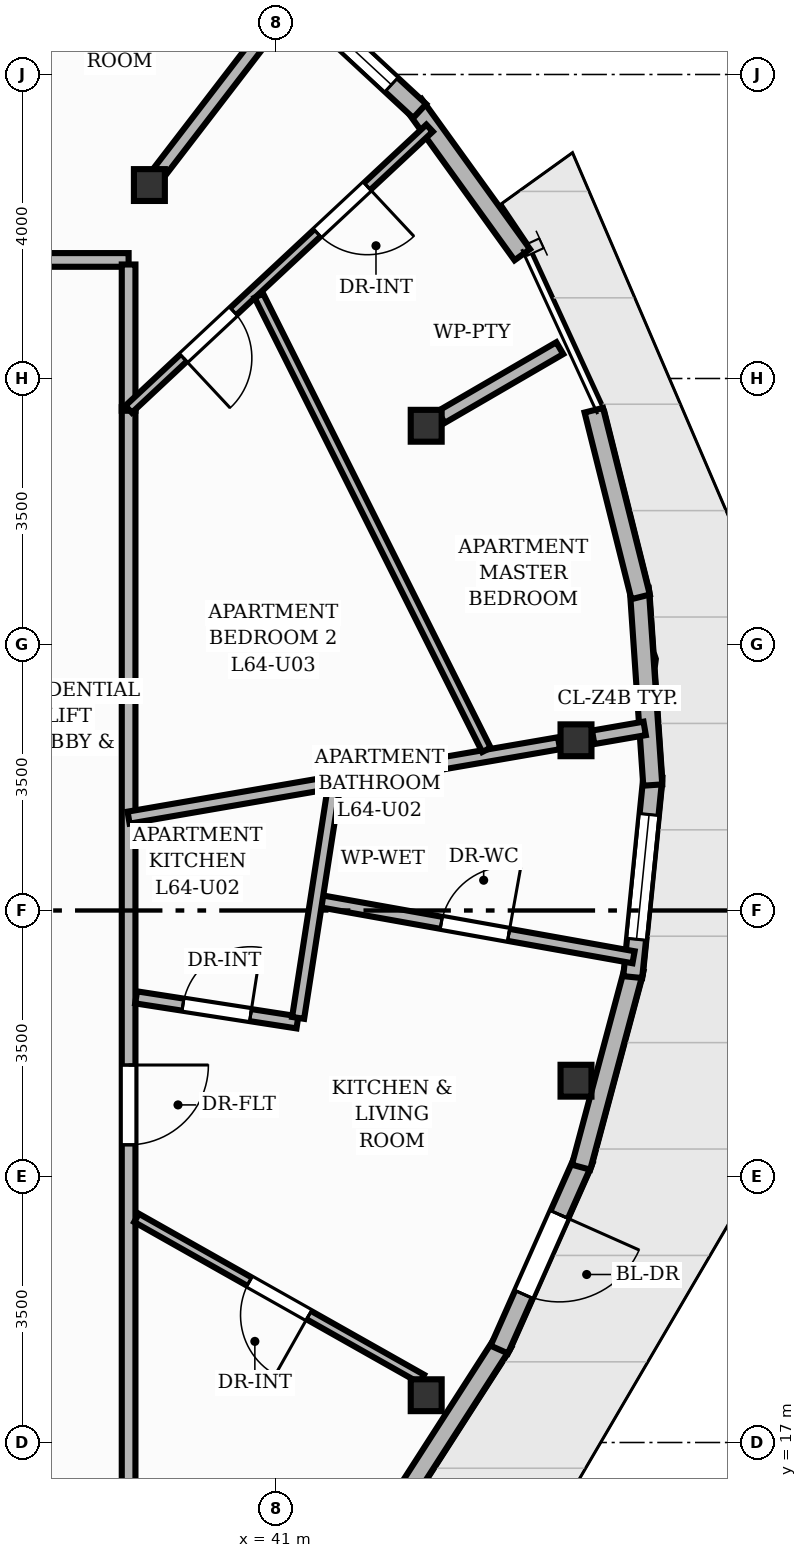
"""IFC4 building model, lengths in metres.
Left out: names, types, materials, properties, quantities, classifications, styles, units other than length and angle.
Written with IfcOpenShell. Run it as: python <this file> out.ifc"""

import sys

from ifc_helpers import new_model, si_unit, direction, frame, frame_2d, origin, origin_2d, place, context, subcontext, project, spatial, rectangle, i_section, extrude, element, fill, save


model = new_model("IFC4")
c1 = context("Model", 3, precision=1e-05, world=origin(), true_north=direction((0.0, 1.0)))
c2 = subcontext(c1, "Body", "Model", "MODEL_VIEW")
j1 = project(units=[si_unit("LENGTHUNIT", "METRE"), si_unit("PLANEANGLEUNIT", "RADIAN")], contexts=[c1])
p1 = place(None, origin())
s1 = spatial("IfcSite", under=j1, at=p1, CompositionType="ELEMENT")
p2 = place(p1, origin())
s2 = spatial("IfcBuilding", under=s1, at=p2, CompositionType="ELEMENT")
p3 = place(p2, frame((0.0, 0.0, 214.24)))
s3 = spatial("IfcBuildingStorey", under=s2, at=p3, CompositionType="ELEMENT", Elevation=214.24)
for number, where, z_axis, x_axis in (
    (1, (44.946, 26.24, 0.0), (0.0, 0.0, 1.0), (1.0, 0.0, 0.0)),
    (2, (42.975, 30.378, 0.0), (0.0, 0.0, 1.0), (1.0, 0.0, 0.0)),
    (3, (39.333, 33.545, 0.0), (0.0, 0.0, 1.0), (1.0, 0.0, 0.0)),
    (4, (42.975, 17.622, 0.0), (0.0, 0.0, 1.0), (1.0, 0.0, 0.0)),
    (5, (44.946, 21.76, 0.0), (0.0, 0.0, 1.0), (1.0, 0.0, 0.0)),
):
    element("IfcColumn", number, at=place(p3, frame(where, z_axis=z_axis, x_axis=x_axis)), inside=s3, PredefinedType="COLUMN", context=c2, shape_type="SweptSolid", body=[
        extrude(i_section(OverallWidth=0.407, OverallDepth=0.419, WebThickness=0.031, FlangeThickness=0.049, at=origin_2d()), origin(), (0.0, 0.0, 1.0), 3.2),
    ])
p4 = place(p3, frame((43.988, 18.319, 0.0), z_axis=(0.0, 0.0, 1.0), x_axis=(-0.540690479286, -0.841221615039, 0.0)))
e6 = element("IfcWall", 6, at=p4, inside=s3, PredefinedType="SOLIDWALL", context=c2, shape_type="SweptSolid", body=[
    extrude(rectangle(XDim=2.758, YDim=0.25, at=frame_2d((1.379, 0.0))), origin(), (0.0, 0.0, 1.0), 2.96),
])
p5 = place(p3, frame((45.049, 20.726, 0.0), z_axis=(0.0, 0.0, 1.0), x_axis=(-0.40624599189, -0.913763751783, 0.0)))
e7 = element("IfcWall", 7, at=p5, inside=s3, PredefinedType="SOLIDWALL", context=c2, shape_type="SweptSolid", body=[
    extrude(rectangle(XDim=2.739, YDim=0.25, at=frame_2d((1.369, 0.0))), origin(), (0.0, 0.0, 1.0), 2.96),
])
p6 = place(p5, frame((0.794, 0.0, 0.0)))
e8 = element("IfcOpeningElement", 8, at=p6, cuts=e7, PredefinedType="OPENING", context=c2, shape_type="SweptSolid", body=[
    extrude(rectangle(XDim=1.15, YDim=2.2, at=frame_2d((0.575, 1.1))), frame((0.0, 0.135, 0.0), z_axis=(0.0, -1.0, 0.0), x_axis=(1.0, 0.0, 0.0)), (0.0, 0.0, 1.0), 0.27),
])
p7 = place(p3, frame((45.712, 23.232, 0.0), z_axis=(0.0, 0.0, 1.0), x_axis=(-0.259023691836, -0.965870968126, 0.0)))
e9 = element("IfcWall", 9, at=p7, inside=s3, PredefinedType="SOLIDWALL", context=c2, shape_type="SweptSolid", body=[
    extrude(rectangle(XDim=2.701, YDim=0.25, at=frame_2d((1.351, 0.0))), origin(), (0.0, 0.0, 1.0), 2.577),
])
p8 = place(p3, frame((45.958, 25.761, 0.0), z_axis=(0.0, 0.0, 1.0), x_axis=(-0.100196668354, -0.99496765156, 0.0)))
e10 = element("IfcWall", 10, at=p8, inside=s3, PredefinedType="SOLIDWALL", context=c2, shape_type="SweptSolid", body=[
    extrude(rectangle(XDim=2.651, YDim=0.25, at=frame_2d((1.326, 0.0))), origin(), (0.0, 0.0, 1.0), 2.96),
])
p9 = place(p8, frame((0.501, 0.0, 0.85)))
e11 = element("IfcOpeningElement", 11, at=p9, cuts=e10, PredefinedType="OPENING", context=c2, shape_type="SweptSolid", body=[
    extrude(rectangle(XDim=1.65, YDim=1.55, at=frame_2d((0.825, 0.775))), frame((0.0, 0.135, 0.0), z_axis=(0.0, -1.0, 0.0), x_axis=(1.0, 0.0, 0.0)), (0.0, 0.0, 1.0), 0.27),
])
p10 = place(p3, frame((45.779, 28.237, 0.0), z_axis=(0.0, 0.0, 1.0), x_axis=(0.068469168344, -0.997653232835, 0.0)))
e12 = element("IfcWall", 12, at=p10, inside=s3, PredefinedType="SOLIDWALL", context=c2, shape_type="SweptSolid", body=[
    extrude(rectangle(XDim=2.592, YDim=0.25, at=frame_2d((1.296, 0.0))), origin(), (0.0, 0.0, 1.0), 2.96),
])
p11 = place(p3, frame((45.18, 30.583, 0.0), z_axis=(0.0, 0.0, 1.0), x_axis=(0.243170809566, -0.969983483042, 0.0)))
e13 = element("IfcWall", 13, at=p11, inside=s3, PredefinedType="SOLIDWALL", context=c2, shape_type="SweptSolid", body=[
    extrude(rectangle(XDim=2.532, YDim=0.25, at=frame_2d((1.266, 0.0))), origin(), (0.0, 0.0, 1.0), 2.96),
])
p12 = place(p3, frame((42.814, 34.605, 0.0), z_axis=(0.0, 0.0, 1.0), x_axis=(0.584824573101, -0.811159798497, 0.0)))
e14 = element("IfcWall", 14, at=p12, inside=s3, PredefinedType="SOLIDWALL", context=c2, shape_type="SweptSolid", body=[
    extrude(rectangle(XDim=2.437, YDim=0.25, at=frame_2d((1.218, 0.0))), origin(), (0.0, 0.0, 1.0), 2.96),
])
p13 = place(p3, frame((41.119, 36.161, 0.0), z_axis=(0.0, 0.0, 1.0), x_axis=(0.733441361842, -0.679752726173, 0.0)))
e15 = element("IfcWall", 15, at=p13, inside=s3, PredefinedType="SOLIDWALL", context=c2, shape_type="SweptSolid", body=[
    extrude(rectangle(XDim=2.415, YDim=0.25, at=frame_2d((1.207, 0.0))), origin(), (0.0, 0.0, 1.0), 2.96),
])
p14 = place(p13, frame((0.507, 0.0, 0.85)))
e16 = element("IfcOpeningElement", 16, at=p14, cuts=e15, PredefinedType="OPENING", context=c2, shape_type="SweptSolid", body=[
    extrude(rectangle(XDim=1.4, YDim=1.55, at=frame_2d((0.7, 0.775))), frame((0.0, 0.135, 0.0), z_axis=(0.0, -1.0, 0.0), x_axis=(1.0, 0.0, 0.0)), (0.0, 0.0, 1.0), 0.27),
])
p15 = place(p3, frame((45.173, 26.279, 0.0), z_axis=(0.0, 0.0, 1.0), x_axis=(0.985357392461, 0.170501639647, 0.0)))
e17 = element("IfcWall", 17, at=p15, inside=s3, PredefinedType="PARTITIONING", context=c2, shape_type="SweptSolid", body=[
    extrude(rectangle(XDim=0.687, YDim=0.18, at=frame_2d((0.344, 0.0))), origin(), (0.0, 0.0, 1.0), 2.403),
])
p16 = place(p3, frame((43.174, 30.493, 0.0), z_axis=(0.0, 0.0, 1.0), x_axis=(0.864637155841, 0.502396843879, 0.0)))
e18 = element("IfcWall", 18, at=p16, inside=s3, PredefinedType="PARTITIONING", context=c2, shape_type="SweptSolid", body=[
    extrude(rectangle(XDim=1.803, YDim=0.18, at=frame_2d((0.901, 0.0))), origin(), (0.0, 0.0, 1.0), 2.403),
])
p17 = place(p3, frame((39.473, 33.727, 0.0), z_axis=(0.0, 0.0, 1.0), x_axis=(0.609244614772, 0.792982344931, 0.0)))
e19 = element("IfcWall", 19, at=p17, inside=s3, PredefinedType="PARTITIONING", context=c2, shape_type="SweptSolid", body=[
    extrude(rectangle(XDim=2.861, YDim=0.18, at=frame_2d((1.43, 0.0))), origin(), (0.0, 0.0, 1.0), 2.403),
])
p18 = place(p3, frame((39.06, 30.623, 0.0), z_axis=(0.0, 0.0, 1.0), x_axis=(0.0, -1.0, 0.0)))
e20 = element("IfcWall", 20, at=p18, inside=s3, PredefinedType="PARTITIONING", context=c2, shape_type="SweptSolid", body=[
    extrude(rectangle(XDim=15.183, YDim=0.18, at=frame_2d((7.591, 0.0))), origin(), (0.0, 0.0, 1.0), 2.955),
])
p19 = place(p18, frame((8.656, 0.0, 0.0)))
e21 = element("IfcOpeningElement", 21, at=p19, cuts=e20, PredefinedType="OPENING", context=c2, shape_type="SweptSolid", body=[
    extrude(rectangle(XDim=1.05, YDim=2.15, at=frame_2d((0.525, 1.075))), frame((0.0, 0.1, 0.0), z_axis=(0.0, -1.0, 0.0), x_axis=(1.0, 0.0, 0.0)), (0.0, 0.0, 1.0), 0.2),
])
p20 = place(p3, frame((33.2, 32.56, 0.0), z_axis=(0.0, 0.0, 1.0), x_axis=(1.0, 0.0, 0.0)))
e22 = element("IfcWall", 22, at=p20, inside=s3, PredefinedType="PARTITIONING", context=c2, shape_type="SweptSolid", body=[
    extrude(rectangle(XDim=5.86, YDim=0.18, at=frame_2d((2.93, 0.0))), origin(), (0.0, 0.0, 1.0), 2.955),
])
p21 = place(p20, frame((3.227, 0.0, 0.0)))
e23 = element("IfcOpeningElement", 23, at=p21, cuts=e22, PredefinedType="OPENING", context=c2, shape_type="SweptSolid", body=[
    extrude(rectangle(XDim=1.05, YDim=2.15, at=frame_2d((0.525, 1.075))), frame((0.0, 0.1, 0.0), z_axis=(0.0, -1.0, 0.0), x_axis=(1.0, 0.0, 0.0)), (0.0, 0.0, 1.0), 0.2),
])
p22 = place(p3, frame((39.06, 32.5, 0.0), z_axis=(0.0, 0.0, 1.0), x_axis=(0.0, -1.0, 0.0)))
e24 = element("IfcWall", 24, at=p22, inside=s3, PredefinedType="PARTITIONING", context=c2, shape_type="SweptSolid", body=[
    extrude(rectangle(XDim=1.925, YDim=0.18, at=frame_2d((0.962, 0.0))), origin(), (0.0, 0.0, 1.0), 2.955),
])
p23 = place(p3, frame((41.53, 24.132, 0.0), z_axis=(0.0, 0.0, 1.0), x_axis=(0.98434454673, -0.176254966805, 0.0)))
e25 = element("IfcWall", 25, at=p23, inside=s3, PredefinedType="PLUMBINGWALL", context=c2, shape_type="SweptSolid", body=[
    extrude(rectangle(XDim=4.24, YDim=0.16, at=frame_2d((2.12, 0.0))), origin(), (0.0, 0.0, 1.0), 2.955),
])
p24 = place(p23, frame((1.67, 0.0, 0.0)))
e26 = element("IfcOpeningElement", 26, at=p24, cuts=e25, PredefinedType="OPENING", context=c2, shape_type="SweptSolid", body=[
    extrude(rectangle(XDim=0.9, YDim=2.1, at=frame_2d((0.45, 1.05))), frame((0.0, 0.09, 0.0), z_axis=(0.0, -1.0, 0.0), x_axis=(1.0, 0.0, 0.0)), (0.0, 0.0, 1.0), 0.18),
])
p25 = place(p3, frame((42.917, 17.837, 0.0), z_axis=(0.0, 0.0, 1.0), x_axis=(-0.870825482781, 0.491592288933, 0.0)))
e27 = element("IfcWall", 27, at=p25, inside=s3, PredefinedType="PARTITIONING", context=c2, shape_type="SweptSolid", body=[
    extrude(rectangle(XDim=4.309, YDim=0.125, at=frame_2d((2.154, 0.0))), origin(), (0.0, 0.0, 1.0), 2.403),
])
p26 = place(p25, frame((1.705, 0.0, 0.0)))
e28 = element("IfcOpeningElement", 28, at=p26, cuts=e27, PredefinedType="OPENING", context=c2, shape_type="SweptSolid", body=[
    extrude(rectangle(XDim=0.9, YDim=2.1, at=frame_2d((0.45, 1.05))), frame((0.0, 0.073, 0.0), z_axis=(0.0, -1.0, 0.0), x_axis=(1.0, 0.0, 0.0)), (0.0, 0.0, 1.0), 0.145),
])
p27 = place(p3, frame((39.159, 22.857, 0.0), z_axis=(0.0, 0.0, 1.0), x_axis=(0.98817241845, -0.15334689894, 0.0)))
e29 = element("IfcWall", 29, at=p27, inside=s3, PredefinedType="PLUMBINGWALL", context=c2, shape_type="SweptSolid", body=[
    extrude(rectangle(XDim=2.148, YDim=0.16, at=frame_2d((1.074, 0.0))), origin(), (0.0, 0.0, 1.0), 2.403),
])
p28 = place(p27, frame((0.624, 0.0, 0.0)))
e30 = element("IfcOpeningElement", 30, at=p28, cuts=e29, PredefinedType="OPENING", context=c2, shape_type="SweptSolid", body=[
    extrude(rectangle(XDim=0.9, YDim=2.1, at=frame_2d((0.45, 1.05))), frame((0.0, 0.09, 0.0), z_axis=(0.0, -1.0, 0.0), x_axis=(1.0, 0.0, 0.0)), (0.0, 0.0, 1.0), 0.18),
])
p29 = place(p3, frame((41.29, 22.587, 0.0), z_axis=(0.0, 0.0, 1.0), x_axis=(0.153371357182, 0.988168622653, 0.0)))
e31 = element("IfcWall", 31, at=p29, inside=s3, PredefinedType="PLUMBINGWALL", context=c2, shape_type="SweptSolid", body=[
    extrude(rectangle(XDim=3.141, YDim=0.16, at=frame_2d((1.57, 0.0))), origin(), (0.0, 0.0, 1.0), 2.955),
])
p30 = place(p3, frame((39.06, 25.222, 0.0), z_axis=(0.0, 0.0, 1.0), x_axis=(0.985376851804, 0.170389142636, 0.0)))
e32 = element("IfcWall", 32, at=p30, inside=s3, PredefinedType="PLUMBINGWALL", context=c2, shape_type="SweptSolid", body=[
    extrude(rectangle(XDim=5.747, YDim=0.16, at=frame_2d((2.874, 0.0))), origin(), (0.0, 0.0, 1.0), 2.403),
])
p31 = place(p3, frame((43.02, 34.294, 0.0), z_axis=(0.0, 0.0, 1.0), x_axis=(-0.730757039427, -0.682637641307, 0.0)))
e33 = element("IfcWall", 33, at=p31, inside=s3, PredefinedType="PARTITIONING", context=c2, shape_type="SweptSolid", body=[
    extrude(rectangle(XDim=5.419, YDim=0.125, at=frame_2d((2.709, 0.0))), origin(), (0.0, 0.0, 1.0), 2.955),
])
p32 = place(p31, frame((1.122, 0.0, 0.0)))
e34 = element("IfcOpeningElement", 34, at=p32, cuts=e33, PredefinedType="OPENING", context=c2, shape_type="SweptSolid", body=[
    extrude(rectangle(XDim=0.9, YDim=2.1, at=frame_2d((0.45, 1.05))), frame((0.0, 0.073, 0.0), z_axis=(0.0, -1.0, 0.0), x_axis=(1.0, 0.0, 0.0)), (0.0, 0.0, 1.0), 0.145),
])
p33 = place(p31, frame((3.531, 0.0, 0.0)))
e35 = element("IfcOpeningElement", 35, at=p33, cuts=e33, PredefinedType="OPENING", context=c2, shape_type="SweptSolid", body=[
    extrude(rectangle(XDim=0.9, YDim=2.1, at=frame_2d((0.45, 1.05))), frame((0.0, 0.073, 0.0), z_axis=(0.0, -1.0, 0.0), x_axis=(1.0, 0.0, 0.0)), (0.0, 0.0, 1.0), 0.145),
])
p34 = place(p3, frame((43.768, 26.114, 0.0), z_axis=(0.0, 0.0, 1.0), x_axis=(-0.447958394428, 0.894054403748, 0.0)))
e36 = element("IfcWall", 36, at=p34, inside=s3, PredefinedType="PARTITIONING", context=c2, shape_type="SweptSolid", body=[
    extrude(rectangle(XDim=6.686, YDim=0.125, at=frame_2d((3.343, 0.0))), origin(), (0.0, 0.0, 1.0), 2.488),
])
p35 = place(p6, origin())
e37 = element("IfcDoor", 37, at=p35, inside=s3, OperationType="SINGLE_SWING_LEFT", PredefinedType="DOOR", context=c2, shape_type="SweptSolid", body=[
    extrude(rectangle(XDim=1.15, YDim=2.2, at=frame_2d((0.575, 1.1))), frame((0.0, 0.025, 0.0), z_axis=(0.0, -1.0, 0.0), x_axis=(1.0, 0.0, 0.0)), (0.0, 0.0, 1.0), 0.05),
])
fill(e8, e37)
p36 = place(p9, origin())
e38 = element("IfcWindow", 38, at=p36, inside=s3, PartitioningType="SINGLE_PANEL", PredefinedType="WINDOW", context=c2, shape_type="SweptSolid", body=[
    extrude(rectangle(XDim=1.65, YDim=1.55, at=frame_2d((0.825, 0.775))), frame((0.0, 0.03, 0.0), z_axis=(0.0, -1.0, 0.0), x_axis=(1.0, 0.0, 0.0)), (0.0, 0.0, 1.0), 0.06),
])
fill(e11, e38)
p37 = place(p14, origin())
e39 = element("IfcWindow", 39, at=p37, inside=s3, PartitioningType="SINGLE_PANEL", PredefinedType="WINDOW", context=c2, shape_type="SweptSolid", body=[
    extrude(rectangle(XDim=1.4, YDim=1.55, at=frame_2d((0.7, 0.775))), frame((0.0, 0.03, 0.0), z_axis=(0.0, -1.0, 0.0), x_axis=(1.0, 0.0, 0.0)), (0.0, 0.0, 1.0), 0.06),
])
fill(e16, e39)
p38 = place(p19, origin())
e40 = element("IfcDoor", 40, at=p38, inside=s3, OperationType="SINGLE_SWING_LEFT", PredefinedType="DOOR", context=c2, shape_type="SweptSolid", body=[
    extrude(rectangle(XDim=1.05, YDim=2.15, at=frame_2d((0.525, 1.075))), frame((0.0, 0.025, 0.0), z_axis=(0.0, -1.0, 0.0), x_axis=(1.0, 0.0, 0.0)), (0.0, 0.0, 1.0), 0.05),
])
fill(e21, e40)
p39 = place(p24, origin())
e41 = element("IfcDoor", 41, at=p39, inside=s3, OperationType="SINGLE_SWING_RIGHT", PredefinedType="DOOR", context=c2, shape_type="SweptSolid", body=[
    extrude(rectangle(XDim=0.9, YDim=2.1, at=frame_2d((0.45, 1.05))), frame((0.0, 0.025, 0.0), z_axis=(0.0, -1.0, 0.0), x_axis=(1.0, 0.0, 0.0)), (0.0, 0.0, 1.0), 0.05),
])
fill(e26, e41)
p40 = place(p26, origin())
e42 = element("IfcDoor", 42, at=p40, inside=s3, OperationType="SINGLE_SWING_LEFT", PredefinedType="DOOR", context=c2, shape_type="SweptSolid", body=[
    extrude(rectangle(XDim=0.9, YDim=2.1, at=frame_2d((0.45, 1.05))), frame((0.0, 0.025, 0.0), z_axis=(0.0, -1.0, 0.0), x_axis=(1.0, 0.0, 0.0)), (0.0, 0.0, 1.0), 0.05),
])
fill(e28, e42)
p41 = place(p28, origin())
e43 = element("IfcDoor", 43, at=p41, inside=s3, OperationType="SINGLE_SWING_RIGHT", PredefinedType="DOOR", context=c2, shape_type="SweptSolid", body=[
    extrude(rectangle(XDim=0.9, YDim=2.1, at=frame_2d((0.45, 1.05))), frame((0.0, 0.025, 0.0), z_axis=(0.0, -1.0, 0.0), x_axis=(1.0, 0.0, 0.0)), (0.0, 0.0, 1.0), 0.05),
])
fill(e30, e43)
p42 = place(p32, origin())
e44 = element("IfcDoor", 44, at=p42, inside=s3, OperationType="SINGLE_SWING_LEFT", PredefinedType="DOOR", context=c2, shape_type="SweptSolid", body=[
    extrude(rectangle(XDim=0.9, YDim=2.1, at=frame_2d((0.45, 1.05))), frame((0.0, 0.025, 0.0), z_axis=(0.0, -1.0, 0.0), x_axis=(1.0, 0.0, 0.0)), (0.0, 0.0, 1.0), 0.05),
])
fill(e34, e44)
p43 = place(p33, origin())
e45 = element("IfcDoor", 45, at=p43, inside=s3, OperationType="SINGLE_SWING_RIGHT", PredefinedType="DOOR", context=c2, shape_type="SweptSolid", body=[
    extrude(rectangle(XDim=0.9, YDim=2.1, at=frame_2d((0.45, 1.05))), frame((0.0, 0.025, 0.0), z_axis=(0.0, -1.0, 0.0), x_axis=(1.0, 0.0, 0.0)), (0.0, 0.0, 1.0), 0.05),
])
fill(e35, e45)
save(model, sys.argv[1])
